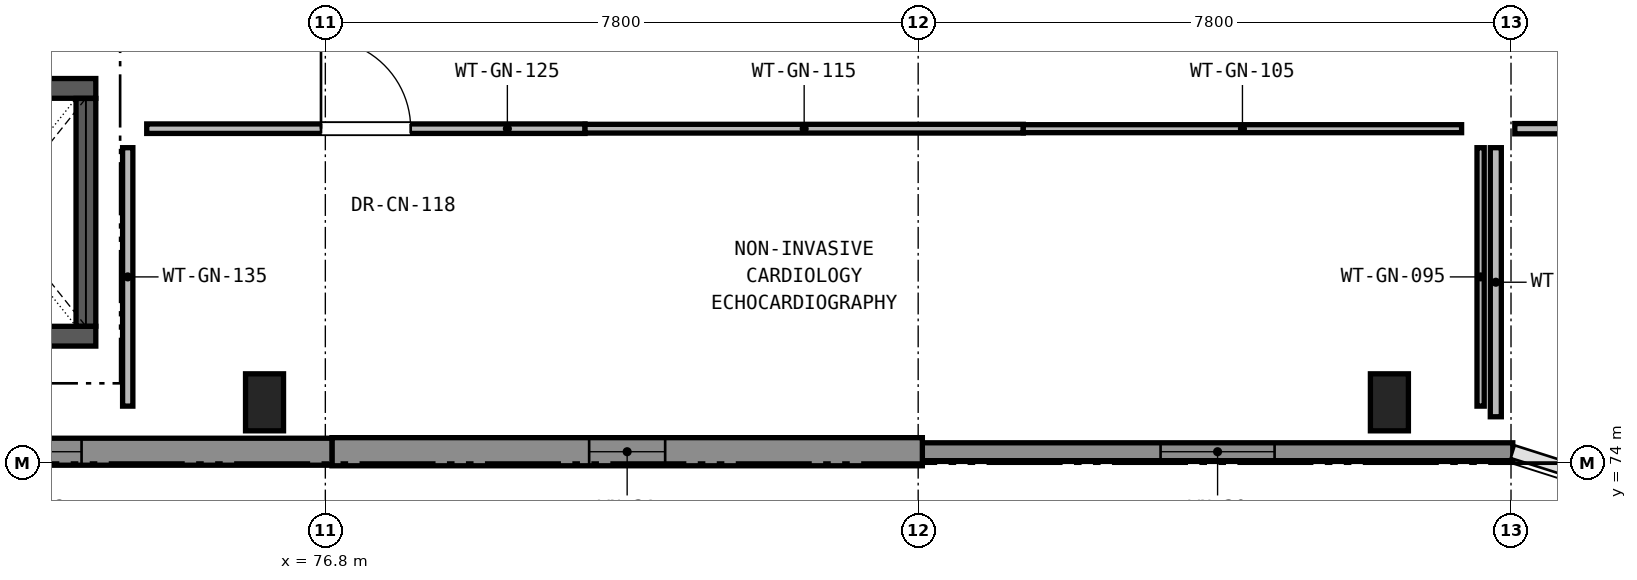
"""IFC4 building model, lengths in metres.
Left out: names, types, materials, properties, quantities, classifications, styles, units other than length and angle.
Written with IfcOpenShell. Run it as: python <this file> out.ifc"""

import sys

from ifc_helpers import new_model, si_unit, direction, frame, frame_2d, origin, origin_2d, place, context, subcontext, project, spatial, rectangle, extrude, element, fill, save


model = new_model("IFC4")
c1 = context("Model", 3, precision=1e-05, world=origin(), true_north=direction((0.0, 1.0)))
c2 = subcontext(c1, "Body", "Model", "MODEL_VIEW")
j1 = project(units=[si_unit("LENGTHUNIT", "METRE"), si_unit("PLANEANGLEUNIT", "RADIAN")], contexts=[c1])
p1 = place(None, origin())
s1 = spatial("IfcSite", under=j1, at=p1, CompositionType="ELEMENT")
p2 = place(p1, origin())
s2 = spatial("IfcBuilding", under=s1, at=p2, CompositionType="ELEMENT")
p3 = place(p2, frame((0.0, 0.0, 13.6)))
s3 = spatial("IfcBuildingStorey", under=s2, at=p3, CompositionType="ELEMENT", Elevation=13.6)
for number, where, z_axis, x_axis in (
    (1, (76.0, 74.8, 0.0), (0.0, 0.0, 1.0), (1.0, 0.0, 0.0)),
    (2, (90.8, 74.8, 0.0), (0.0, 0.0, 1.0), (1.0, 0.0, 0.0)),
):
    element("IfcColumn", number, at=place(p3, frame(where, z_axis=z_axis, x_axis=x_axis)), inside=s3, PredefinedType="COLUMN", context=c2, shape_type="SweptSolid", body=[
        extrude(rectangle(XDim=0.5, YDim=0.75, at=origin_2d()), origin(), (0.0, 0.0, 1.0), 4.08),
    ])
p4 = place(p3, frame((92.423, 74.15, 0.0), z_axis=(0.0, 0.0, 1.0), x_axis=(-1.0, 0.0, 0.0)))
e3 = element("IfcWall", 3, at=p4, inside=s3, PredefinedType="SOLIDWALL", context=c2, shape_type="SweptSolid", body=[
    extrude(rectangle(XDim=7.768, YDim=0.235, at=frame_2d((3.884, 0.0))), origin(), (0.0, 0.0, 1.0), 3.775),
])
p5 = place(p4, frame((3.134, 0.0, 0.9)))
e4 = element("IfcOpeningElement", 4, at=p5, cuts=e3, PredefinedType="OPENING", context=c2, shape_type="SweptSolid", body=[
    extrude(rectangle(XDim=1.5, YDim=2.2, at=frame_2d((0.75, 1.1))), frame((0.0, 0.127, 0.0), z_axis=(0.0, -1.0, 0.0), x_axis=(1.0, 0.0, 0.0)), (0.0, 0.0, 1.0), 0.255),
])
p6 = place(p3, frame((84.655, 74.15, 0.0), z_axis=(0.0, 0.0, 1.0), x_axis=(-1.0, 0.0, 0.0)))
e5 = element("IfcWall", 5, at=p6, inside=s3, PredefinedType="SOLIDWALL", context=c2, shape_type="SweptSolid", body=[
    extrude(rectangle(XDim=7.768, YDim=0.37, at=frame_2d((3.884, 0.0))), origin(), (0.0, 0.0, 1.0), 3.775),
])
p7 = place(p6, frame((3.384, 0.0, 0.9)))
e6 = element("IfcOpeningElement", 6, at=p7, cuts=e5, PredefinedType="OPENING", context=c2, shape_type="SweptSolid", body=[
    extrude(rectangle(XDim=1.0, YDim=1.62, at=frame_2d((0.5, 0.81))), frame((0.0, 0.195, 0.0), z_axis=(0.0, -1.0, 0.0), x_axis=(1.0, 0.0, 0.0)), (0.0, 0.0, 1.0), 0.39),
])
p8 = place(p3, frame((76.887, 74.15, 0.0), z_axis=(0.0, 0.0, 1.0), x_axis=(-1.0, 0.0, 0.0)))
e7 = element("IfcWall", 7, at=p8, inside=s3, PredefinedType="SOLIDWALL", context=c2, shape_type="SweptSolid", body=[
    extrude(rectangle(XDim=7.768, YDim=0.355, at=frame_2d((3.884, 0.0))), origin(), (0.0, 0.0, 1.0), 3.775),
])
p9 = place(p8, frame((3.294, 0.0, 0.9)))
e8 = element("IfcOpeningElement", 8, at=p9, cuts=e7, PredefinedType="OPENING", context=c2, shape_type="SweptSolid", body=[
    extrude(rectangle(XDim=1.18, YDim=1.62, at=frame_2d((0.59, 0.81))), frame((0.0, 0.188, 0.0), z_axis=(0.0, -1.0, 0.0), x_axis=(1.0, 0.0, 0.0)), (0.0, 0.0, 1.0), 0.375),
])
p10 = place(p3, frame((71.122, 75.67, 0.0), z_axis=(0.0, 0.0, 1.0), x_axis=(1.0, 0.0, 0.0)))
e9 = element("IfcWall", 9, at=p10, inside=s3, PredefinedType="SHEAR", context=c2, shape_type="SweptSolid", body=[
    extrude(rectangle(XDim=2.658, YDim=0.26, at=frame_2d((1.329, 0.0))), origin(), (0.0, 0.0, 1.0), 3.775),
])
p11 = place(p3, frame((71.122, 78.93, 0.0), z_axis=(0.0, 0.0, 1.0), x_axis=(1.0, 0.0, 0.0)))
e10 = element("IfcWall", 10, at=p11, inside=s3, PredefinedType="SHEAR", context=c2, shape_type="SweptSolid", body=[
    extrude(rectangle(XDim=2.658, YDim=0.26, at=frame_2d((1.329, 0.0))), origin(), (0.0, 0.0, 1.0), 3.775),
])
p12 = place(p11, frame((0.679, 0.0, 0.0)))
e11 = element("IfcOpeningElement", 11, at=p12, cuts=e10, PredefinedType="OPENING", context=c2, shape_type="SweptSolid", body=[
    extrude(rectangle(XDim=1.3, YDim=2.2, at=frame_2d((0.65, 1.1))), frame((0.0, 0.14, 0.0), z_axis=(0.0, -1.0, 0.0), x_axis=(1.0, 0.0, 0.0)), (0.0, 0.0, 1.0), 0.28),
])
p13 = place(p3, frame((73.65, 75.802, 0.0), z_axis=(0.0, 0.0, 1.0), x_axis=(0.0, 1.0, 0.0)))
e12 = element("IfcWall", 12, at=p13, inside=s3, PredefinedType="SHEAR", context=c2, shape_type="SweptSolid", body=[
    extrude(rectangle(XDim=2.996, YDim=0.26, at=frame_2d((1.498, 0.0))), origin(), (0.0, 0.0, 1.0), 3.775),
])
p14 = place(p3, frame((74.2, 74.75, 0.0), z_axis=(0.0, 0.0, 1.0), x_axis=(0.0, 1.0, 0.0)))
e13 = element("IfcWall", 13, at=p14, inside=s3, PredefinedType="PARTITIONING", context=c2, shape_type="SweptSolid", body=[
    extrude(rectangle(XDim=3.4, YDim=0.135, at=frame_2d((1.7, 0.0))), origin(), (0.0, 0.0, 1.0), 3.225),
])
p15 = place(p3, frame((74.45, 78.4, 0.0), z_axis=(0.0, 0.0, 1.0), x_axis=(1.0, 0.0, 0.0)))
e14 = element("IfcWall", 14, at=p15, inside=s3, PredefinedType="PARTITIONING", context=c2, shape_type="SweptSolid", body=[
    extrude(rectangle(XDim=5.767, YDim=0.125, at=frame_2d((2.884, 0.0))), origin(), (0.0, 0.0, 1.0), 3.175),
])
p16 = place(p15, frame((2.293, 0.0, 0.0)))
e15 = element("IfcOpeningElement", 15, at=p16, cuts=e14, PredefinedType="OPENING", context=c2, shape_type="SweptSolid", body=[
    extrude(rectangle(XDim=1.18, YDim=2.2, at=frame_2d((0.59, 1.1))), frame((0.0, 0.073, 0.0), z_axis=(0.0, -1.0, 0.0), x_axis=(1.0, 0.0, 0.0)), (0.0, 0.0, 1.0), 0.145),
])
p17 = place(p3, frame((80.217, 78.4, 0.0), z_axis=(0.0, 0.0, 1.0), x_axis=(1.0, 0.0, 0.0)))
e16 = element("IfcWall", 16, at=p17, inside=s3, PredefinedType="PARTITIONING", context=c2, shape_type="SweptSolid", body=[
    extrude(rectangle(XDim=5.766, YDim=0.115, at=frame_2d((2.883, 0.0))), origin(), (0.0, 0.0, 1.0), 3.775),
])
p18 = place(p3, frame((85.983, 78.4, 0.0), z_axis=(0.0, 0.0, 1.0), x_axis=(1.0, 0.0, 0.0)))
e17 = element("IfcWall", 17, at=p18, inside=s3, PredefinedType="PARTITIONING", context=c2, shape_type="SweptSolid", body=[
    extrude(rectangle(XDim=5.767, YDim=0.105, at=frame_2d((2.884, 0.0))), origin(), (0.0, 0.0, 1.0), 2.975),
])
p19 = place(p3, frame((92.0, 78.15, 0.0), z_axis=(0.0, 0.0, 1.0), x_axis=(0.0, -1.0, 0.0)))
e18 = element("IfcWall", 18, at=p19, inside=s3, PredefinedType="PARTITIONING", context=c2, shape_type="SweptSolid", body=[
    extrude(rectangle(XDim=3.4, YDim=0.095, at=frame_2d((1.7, 0.0))), origin(), (0.0, 0.0, 1.0), 3.125),
])
p20 = place(p3, frame((92.2, 74.61, 0.0), z_axis=(0.0, 0.0, 1.0), x_axis=(0.0, 1.0, 0.0)))
e19 = element("IfcWall", 19, at=p20, inside=s3, PredefinedType="PARTITIONING", context=c2, shape_type="SweptSolid", body=[
    extrude(rectangle(XDim=3.54, YDim=0.145, at=frame_2d((1.77, 0.0))), origin(), (0.0, 0.0, 1.0), 3.125),
])
p21 = place(p3, frame((92.45, 78.4, 0.0), z_axis=(0.0, 0.0, 1.0), x_axis=(1.0, 0.0, 0.0)))
e20 = element("IfcWall", 20, at=p21, inside=s3, PredefinedType="PARTITIONING", context=c2, shape_type="SweptSolid", body=[
    extrude(rectangle(XDim=6.017, YDim=0.135, at=frame_2d((3.009, 0.0))), origin(), (0.0, 0.0, 1.0), 3.075),
])
p22 = place(p21, frame((2.438, 0.0, 0.0)))
e21 = element("IfcOpeningElement", 21, at=p22, cuts=e20, PredefinedType="OPENING", context=c2, shape_type="SweptSolid", body=[
    extrude(rectangle(XDim=1.14, YDim=2.2, at=frame_2d((0.57, 1.1))), frame((0.0, 0.077, 0.0), z_axis=(0.0, -1.0, 0.0), x_axis=(1.0, 0.0, 0.0)), (0.0, 0.0, 1.0), 0.155),
])
p23 = place(p5, origin())
e22 = element("IfcWindow", 22, at=p23, inside=s3, PartitioningType="SINGLE_PANEL", PredefinedType="WINDOW", context=c2, shape_type="SweptSolid", body=[
    extrude(rectangle(XDim=1.5, YDim=2.2, at=frame_2d((0.75, 1.1))), frame((0.0, 0.03, 0.0), z_axis=(0.0, -1.0, 0.0), x_axis=(1.0, 0.0, 0.0)), (0.0, 0.0, 1.0), 0.06),
])
fill(e4, e22)
p24 = place(p7, origin())
e23 = element("IfcWindow", 23, at=p24, inside=s3, PartitioningType="SINGLE_PANEL", PredefinedType="WINDOW", context=c2, shape_type="SweptSolid", body=[
    extrude(rectangle(XDim=1.0, YDim=1.62, at=frame_2d((0.5, 0.81))), frame((0.0, 0.03, 0.0), z_axis=(0.0, -1.0, 0.0), x_axis=(1.0, 0.0, 0.0)), (0.0, 0.0, 1.0), 0.06),
])
fill(e6, e23)
p25 = place(p9, origin())
e24 = element("IfcWindow", 24, at=p25, inside=s3, PartitioningType="SINGLE_PANEL", PredefinedType="WINDOW", context=c2, shape_type="SweptSolid", body=[
    extrude(rectangle(XDim=1.18, YDim=1.62, at=frame_2d((0.59, 0.81))), frame((0.0, 0.03, 0.0), z_axis=(0.0, -1.0, 0.0), x_axis=(1.0, 0.0, 0.0)), (0.0, 0.0, 1.0), 0.06),
])
fill(e8, e24)
p26 = place(p16, origin())
e25 = element("IfcDoor", 25, at=p26, inside=s3, OperationType="SINGLE_SWING_LEFT", PredefinedType="DOOR", context=c2, shape_type="SweptSolid", body=[
    extrude(rectangle(XDim=1.18, YDim=2.2, at=frame_2d((0.59, 1.1))), frame((0.0, 0.025, 0.0), z_axis=(0.0, -1.0, 0.0), x_axis=(1.0, 0.0, 0.0)), (0.0, 0.0, 1.0), 0.05),
])
fill(e15, e25)
save(model, sys.argv[1])
